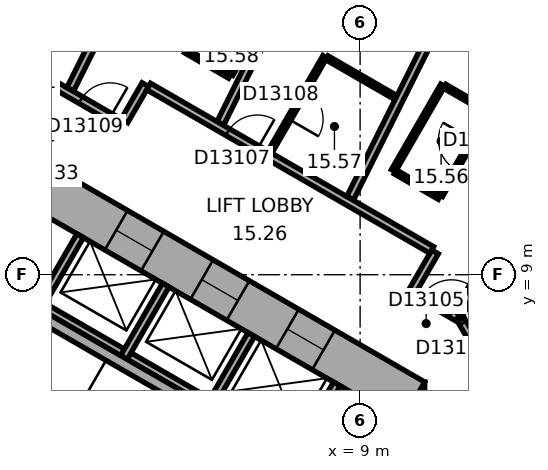
"""IFC4 building model, lengths in metres.
Left out: names, types, materials, properties, quantities, classifications, styles, units other than length and angle.
Written with IfcOpenShell. Run it as: python <this file> out.ifc"""

import sys

from ifc_helpers import new_model, si_unit, direction, frame, frame_2d, origin, place, context, subcontext, project, spatial, rectangle, extrude, element, fill, save


model = new_model("IFC4")
c1 = context("Model", 3, precision=1e-05, world=origin(), true_north=direction((0.0, 1.0)))
c2 = subcontext(c1, "Body", "Model", "MODEL_VIEW")
j1 = project(units=[si_unit("LENGTHUNIT", "METRE"), si_unit("PLANEANGLEUNIT", "RADIAN")], contexts=[c1])
p1 = place(None, origin())
s1 = spatial("IfcSite", under=j1, at=p1, CompositionType="ELEMENT")
p2 = place(p1, origin())
s2 = spatial("IfcBuilding", under=s1, at=p2, CompositionType="ELEMENT")
p3 = place(p2, frame((0.0, 0.0, 70.4)))
s3 = spatial("IfcBuildingStorey", under=s2, at=p3, CompositionType="ELEMENT", Elevation=70.4)
p4 = place(p3, frame((10.1, -6.177, 0.0), z_axis=(0.0, 0.0, 1.0), x_axis=(0.0, 1.0, 0.0)))
e1 = element("IfcWall", 1, at=p4, inside=s3, PredefinedType="SHEAR", context=c2, shape_type="SweptSolid", body=[
    extrude(rectangle(XDim=12.355, YDim=1.2, at=frame_2d((6.177, 0.0))), origin(), (0.0, 0.0, 1.0), 3.3),
])
p5 = place(p4, frame((6.378, 0.0, 0.0)))
e2 = element("IfcOpeningElement", 2, at=p5, cuts=e1, PredefinedType="OPENING", context=c2, shape_type="SweptSolid", body=[
    extrude(rectangle(XDim=1.5, YDim=2.1, at=frame_2d((0.75, 1.05))), frame((0.0, 0.61, 0.0), z_axis=(0.0, -1.0, 0.0), x_axis=(1.0, 0.0, 0.0)), (0.0, 0.0, 1.0), 1.22),
])
p6 = place(p4, frame((1.828, 0.0, 0.0)))
e3 = element("IfcOpeningElement", 3, at=p6, cuts=e1, PredefinedType="OPENING", context=c2, shape_type="SweptSolid", body=[
    extrude(rectangle(XDim=1.1, YDim=2.1, at=frame_2d((0.55, 1.05))), frame((0.0, 0.61, 0.0), z_axis=(0.0, -1.0, 0.0), x_axis=(1.0, 0.0, 0.0)), (0.0, 0.0, 1.0), 1.22),
])
p7 = place(p4, frame((4.427, 0.0, 0.0)))
e4 = element("IfcOpeningElement", 4, at=p7, cuts=e1, PredefinedType="OPENING", context=c2, shape_type="SweptSolid", body=[
    extrude(rectangle(XDim=1.1, YDim=2.1, at=frame_2d((0.55, 1.05))), frame((0.0, 0.61, 0.0), z_axis=(0.0, -1.0, 0.0), x_axis=(1.0, 0.0, 0.0)), (0.0, 0.0, 1.0), 1.22),
])
p8 = place(p3, frame((10.4, 5.658, 0.0), z_axis=(0.0, 0.0, 1.0), x_axis=(-0.866021384402, 0.500006961711, 0.0)))
e5 = element("IfcWall", 5, at=p8, inside=s3, PredefinedType="SHEAR", context=c2, shape_type="SweptSolid", body=[
    extrude(rectangle(XDim=12.355, YDim=1.2, at=frame_2d((6.178, 0.0))), origin(), (0.0, 0.0, 1.0), 3.3),
])
p9 = place(p8, frame((2.728, 0.0, 0.0)))
e6 = element("IfcOpeningElement", 6, at=p9, cuts=e5, PredefinedType="OPENING", context=c2, shape_type="SweptSolid", body=[
    extrude(rectangle(XDim=1.1, YDim=2.1, at=frame_2d((0.55, 1.05))), frame((0.0, 0.61, 0.0), z_axis=(0.0, -1.0, 0.0), x_axis=(1.0, 0.0, 0.0)), (0.0, 0.0, 1.0), 1.22),
])
p10 = place(p8, frame((5.328, 0.0, 0.0)))
e7 = element("IfcOpeningElement", 7, at=p10, cuts=e5, PredefinedType="OPENING", context=c2, shape_type="SweptSolid", body=[
    extrude(rectangle(XDim=1.1, YDim=2.1, at=frame_2d((0.55, 1.05))), frame((0.0, 0.61, 0.0), z_axis=(0.0, -1.0, 0.0), x_axis=(1.0, 0.0, 0.0)), (0.0, 0.0, 1.0), 1.22),
])
p11 = place(p8, frame((7.928, 0.0, 0.0)))
e8 = element("IfcOpeningElement", 8, at=p11, cuts=e5, PredefinedType="OPENING", context=c2, shape_type="SweptSolid", body=[
    extrude(rectangle(XDim=1.1, YDim=2.1, at=frame_2d((0.55, 1.05))), frame((0.0, 0.61, 0.0), z_axis=(0.0, -1.0, 0.0), x_axis=(1.0, 0.0, 0.0)), (0.0, 0.0, 1.0), 1.22),
])
p12 = place(p3, frame((7.424, 4.259, 0.0), z_axis=(0.0, 0.0, 1.0), x_axis=(-0.866026010844, 0.49999894854, 0.0)))
e9 = element("IfcWall", 9, at=p12, inside=s3, PredefinedType="PARTITIONING", context=c2, shape_type="SweptSolid", body=[
    extrude(rectangle(XDim=8.0, YDim=0.2, at=frame_2d((4.0, 0.0))), origin(), (0.0, 0.0, 1.0), 3.05),
])
for number, where, z_axis, x_axis in (
    (10, (7.287, 4.222, 0.0), (0.0, 0.0, 1.0), (0.5, 0.866, 0.0)),
    (11, (5.036, 5.522, 0.0), (0.0, 0.0, 1.0), (0.5, 0.866, 0.0)),
    (12, (2.784, 6.822, 0.0), (0.0, 0.0, 1.0), (0.5, 0.866, 0.0)),
    (13, (0.532, 8.122, 0.0), (0.0, 0.0, 1.0), (0.5, 0.866, 0.0)),
):
    element("IfcWall", number, at=place(p3, frame(where, z_axis=z_axis, x_axis=x_axis)), inside=s3, PredefinedType="PARTITIONING", context=c2, shape_type="SweptSolid", body=[
        extrude(rectangle(XDim=2.2, YDim=0.2, at=frame_2d((1.1, 0.0))), origin(), (0.0, 0.0, 1.0), 3.05),
    ])
p13 = place(p3, frame((6.303, 4.617, 0.0), z_axis=(0.0, 0.0, 1.0), x_axis=(-0.866027801685, 0.499995846692, 0.0)))
e14 = element("IfcWall", 14, at=p13, inside=s3, PredefinedType="SHEAR", context=c2, shape_type="SweptSolid", body=[
    extrude(rectangle(XDim=7.06, YDim=0.3, at=frame_2d((3.53, 0.0))), origin(), (0.0, 0.0, 1.0), 3.05),
])
p14 = place(p3, frame((0.95, 14.001, 0.0), z_axis=(0.0, 0.0, 1.0), x_axis=(-1.0, 0.0, 0.0)))
e15 = element("IfcWall", 15, at=p14, inside=s3, PredefinedType="PARTITIONING", context=c2, shape_type="SweptSolid", body=[
    extrude(rectangle(XDim=1.86, YDim=0.2, at=frame_2d((0.93, 0.0))), origin(), (0.0, 0.0, 1.0), 3.05),
])
p15 = place(p14, frame((0.48, 0.0, 0.0)))
e16 = element("IfcOpeningElement", 16, at=p15, cuts=e15, PredefinedType="OPENING", context=c2, shape_type="SweptSolid", body=[
    extrude(rectangle(XDim=0.9, YDim=2.1, at=frame_2d((0.45, 1.05))), frame((0.0, 0.11, 0.0), z_axis=(0.0, -1.0, 0.0), x_axis=(1.0, 0.0, 0.0)), (0.0, 0.0, 1.0), 0.22),
])
p16 = place(p3, frame((2.748, 12.962, 0.0), z_axis=(0.0, 0.0, 1.0), x_axis=(-0.866013897511, 0.50001992892, 0.0)))
e17 = element("IfcWall", 17, at=p16, inside=s3, PredefinedType="PARTITIONING", context=c2, shape_type="SweptSolid", body=[
    extrude(rectangle(XDim=2.037, YDim=0.2, at=frame_2d((1.018, 0.0))), origin(), (0.0, 0.0, 1.0), 3.05),
])
p17 = place(p16, frame((0.372, 0.0, 0.0)))
e18 = element("IfcOpeningElement", 18, at=p17, cuts=e17, PredefinedType="OPENING", context=c2, shape_type="SweptSolid", body=[
    extrude(rectangle(XDim=0.9, YDim=2.1, at=frame_2d((0.45, 1.05))), frame((0.0, 0.11, 0.0), z_axis=(0.0, -1.0, 0.0), x_axis=(1.0, 0.0, 0.0)), (0.0, 0.0, 1.0), 0.22),
])
p18 = place(p3, frame((3.349, 14.002, 0.0), z_axis=(0.0, 0.0, 1.0), x_axis=(-0.500074377092, -0.865982457891, 0.0)))
e19 = element("IfcWall", 19, at=p18, inside=s3, PredefinedType="PARTITIONING", context=c2, shape_type="SweptSolid", body=[
    extrude(rectangle(XDim=1.101, YDim=0.2, at=frame_2d((0.55, 0.0))), origin(), (0.0, 0.0, 1.0), 3.05),
])
p19 = place(p3, frame((5.351, 21.859, 0.0), z_axis=(0.0, 0.0, 1.0), x_axis=(-0.446205309328, -0.894930624086, 0.0)))
e20 = element("IfcWall", 20, at=p19, inside=s3, PredefinedType="PARTITIONING", context=c2, shape_type="SweptSolid", body=[
    extrude(rectangle(XDim=8.913, YDim=0.2, at=frame_2d((4.457, 0.0))), origin(), (0.0, 0.0, 1.0), 2.6),
])
p20 = place(p3, frame((5.569, 14.222, 0.0), z_axis=(0.0, 0.0, 1.0), x_axis=(-0.866036909293, 0.499980071345, 0.0)))
e21 = element("IfcWall", 21, at=p20, inside=s3, PredefinedType="PARTITIONING", context=c2, shape_type="SweptSolid", body=[
    extrude(rectangle(XDim=1.34, YDim=0.12, at=frame_2d((0.67, 0.0))), origin(), (0.0, 0.0, 1.0), 3.05),
])
p21 = place(p3, frame((6.625, 12.227, 0.0), z_axis=(0.0, 0.0, 1.0), x_axis=(0.500023687443, 0.866011727401, 0.0)))
e22 = element("IfcWall", 22, at=p21, inside=s3, PredefinedType="PARTITIONING", context=c2, shape_type="SweptSolid", body=[
    extrude(rectangle(XDim=2.9, YDim=0.12, at=frame_2d((1.45, 0.0))), origin(), (0.0, 0.0, 1.0), 3.05),
])
p22 = place(p21, frame((1.0, 0.0, 0.0)))
e23 = element("IfcOpeningElement", 23, at=p22, cuts=e22, PredefinedType="OPENING", context=c2, shape_type="SweptSolid", body=[
    extrude(rectangle(XDim=0.9, YDim=2.1, at=frame_2d((0.45, 1.05))), frame((0.0, 0.07, 0.0), z_axis=(0.0, -1.0, 0.0), x_axis=(1.0, 0.0, 0.0)), (0.0, 0.0, 1.0), 0.14),
])
p23 = place(p3, frame((6.839, 16.422, 0.0), z_axis=(0.0, 0.0, 1.0), x_axis=(-0.50000366821, -0.866023285932, 0.0)))
e24 = element("IfcWall", 24, at=p23, inside=s3, PredefinedType="PARTITIONING", context=c2, shape_type="SweptSolid", body=[
    extrude(rectangle(XDim=2.48, YDim=0.12, at=frame_2d((1.24, 0.0))), origin(), (0.0, 0.0, 1.0), 3.05),
])
p24 = place(p3, frame((8.127, 14.708, 0.0), z_axis=(0.0, 0.0, 1.0), x_axis=(0.866065472234, -0.499930592986, 0.0)))
e25 = element("IfcWall", 25, at=p24, inside=s3, PredefinedType="PARTITIONING", context=c2, shape_type="SweptSolid", body=[
    extrude(rectangle(XDim=2.098, YDim=0.12, at=frame_2d((1.049, 0.0))), origin(), (0.0, 0.0, 1.0), 3.05),
])
p25 = place(p3, frame((8.872, 20.104, 0.0), z_axis=(0.0, 0.0, 1.0), x_axis=(-0.446218378653, -0.894924107706, 0.0)))
e26 = element("IfcWall", 26, at=p25, inside=s3, PredefinedType="PARTITIONING", context=c2, shape_type="SweptSolid", body=[
    extrude(rectangle(XDim=7.95, YDim=0.2, at=frame_2d((3.975, 0.0))), origin(), (0.0, 0.0, 1.0), 3.05),
])
p26 = place(p3, frame((9.875, 11.736, 0.0), z_axis=(0.0, 0.0, 1.0), x_axis=(0.499936506574, 0.866062058628, 0.0)))
e27 = element("IfcWall", 27, at=p26, inside=s3, PredefinedType="PARTITIONING", context=c2, shape_type="SweptSolid", body=[
    extrude(rectangle(XDim=2.6, YDim=0.12, at=frame_2d((1.3, 0.0))), origin(), (0.0, 0.0, 1.0), 3.05),
])
p27 = place(p3, frame((10.371, 8.561, 0.0), z_axis=(0.0, 0.0, 1.0), x_axis=(0.499986357472, 0.866033280158, 0.0)))
e28 = element("IfcWall", 28, at=p27, inside=s3, PredefinedType="PARTITIONING", context=c2, shape_type="SweptSolid", body=[
    extrude(rectangle(XDim=1.201, YDim=0.2, at=frame_2d((0.601, 0.0))), origin(), (0.0, 0.0, 1.0), 3.05),
])
p28 = place(p3, frame((10.885, 9.652, 0.0), z_axis=(0.0, 0.0, 1.0), x_axis=(-0.866033868542, 0.499985338323, 0.0)))
e29 = element("IfcWall", 29, at=p28, inside=s3, PredefinedType="PARTITIONING", context=c2, shape_type="SweptSolid", body=[
    extrude(rectangle(XDim=8.602, YDim=0.2, at=frame_2d((4.301, 0.0))), origin(), (0.0, 0.0, 1.0), 3.05),
])
p29 = place(p28, frame((5.302, 0.0, 0.0)))
e30 = element("IfcOpeningElement", 30, at=p29, cuts=e29, PredefinedType="OPENING", context=c2, shape_type="SweptSolid", body=[
    extrude(rectangle(XDim=0.9, YDim=2.1, at=frame_2d((0.45, 1.05))), frame((0.0, 0.11, 0.0), z_axis=(0.0, -1.0, 0.0), x_axis=(1.0, 0.0, 0.0)), (0.0, 0.0, 1.0), 0.22),
])
for number, where, z_axis, x_axis in (
    (31, (11.087, 11.036, 0.0), (0.0, 0.0, 1.0), (-0.866, 0.5, 0.0)),
    (32, (11.226, 13.958, 0.0), (0.0, 0.0, 1.0), (0.866, -0.5, 0.0)),
):
    element("IfcWall", number, at=place(p3, frame(where, z_axis=z_axis, x_axis=x_axis)), inside=s3, PredefinedType="PARTITIONING", context=c2, shape_type="SweptSolid", body=[
        extrude(rectangle(XDim=1.34, YDim=0.12, at=frame_2d((0.67, 0.0))), origin(), (0.0, 0.0, 1.0), 3.05),
    ])
p30 = place(p3, frame((11.566, 7.871, 0.0), z_axis=(0.0, 0.0, 1.0), x_axis=(-0.866004557827, 0.500036104519, 0.0)))
e33 = element("IfcWall", 33, at=p30, inside=s3, PredefinedType="PARTITIONING", context=c2, shape_type="SweptSolid", body=[
    extrude(rectangle(XDim=1.28, YDim=0.2, at=frame_2d((0.64, 0.0))), origin(), (0.0, 0.0, 1.0), 3.05),
])
p31 = place(p30, frame((0.19, 0.0, 0.0)))
e34 = element("IfcOpeningElement", 34, at=p31, cuts=e33, PredefinedType="OPENING", context=c2, shape_type="SweptSolid", body=[
    extrude(rectangle(XDim=0.9, YDim=2.1, at=frame_2d((0.45, 1.05))), frame((0.0, 0.11, 0.0), z_axis=(0.0, -1.0, 0.0), x_axis=(1.0, 0.0, 0.0)), (0.0, 0.0, 1.0), 0.22),
])
p32 = place(p3, frame((12.357, 13.236, 0.0), z_axis=(0.0, 0.0, 1.0), x_axis=(-0.50000366821, -0.866023285932, 0.0)))
e35 = element("IfcWall", 35, at=p32, inside=s3, PredefinedType="PARTITIONING", context=c2, shape_type="SweptSolid", body=[
    extrude(rectangle(XDim=2.48, YDim=0.12, at=frame_2d((1.24, 0.0))), origin(), (0.0, 0.0, 1.0), 3.05),
])
p33 = place(p32, frame((0.79, 0.0, 0.0)))
e36 = element("IfcOpeningElement", 36, at=p33, cuts=e35, PredefinedType="OPENING", context=c2, shape_type="SweptSolid", body=[
    extrude(rectangle(XDim=0.9, YDim=2.1, at=frame_2d((0.45, 1.05))), frame((0.0, 0.07, 0.0), z_axis=(0.0, -1.0, 0.0), x_axis=(1.0, 0.0, 0.0)), (0.0, 0.0, 1.0), 0.14),
])
p34 = place(p3, frame((12.393, 18.348, 0.0), z_axis=(0.0, 0.0, 1.0), x_axis=(-0.446176022699, -0.894945225569, 0.0)))
e37 = element("IfcWall", 37, at=p34, inside=s3, PredefinedType="PARTITIONING", context=c2, shape_type="SweptSolid", body=[
    extrude(rectangle(XDim=8.191, YDim=0.2, at=frame_2d((4.095, 0.0))), origin(), (0.0, 0.0, 1.0), 2.6),
])
p35 = place(p3, frame((12.58, 6.212, 0.0), z_axis=(0.0, 0.0, 1.0), x_axis=(-0.500063286585, 0.865988862174, 0.0)))
e38 = element("IfcWall", 38, at=p35, inside=s3, PredefinedType="PARTITIONING", context=c2, shape_type="SweptSolid", body=[
    extrude(rectangle(XDim=1.86, YDim=0.2, at=frame_2d((0.93, 0.0))), origin(), (0.0, 0.0, 1.0), 3.05),
])
p36 = place(p35, frame((0.842, 0.0, 0.0)))
e39 = element("IfcOpeningElement", 39, at=p36, cuts=e38, PredefinedType="OPENING", context=c2, shape_type="SweptSolid", body=[
    extrude(rectangle(XDim=0.9, YDim=2.1, at=frame_2d((0.45, 1.05))), frame((0.0, 0.11, 0.0), z_axis=(0.0, -1.0, 0.0), x_axis=(1.0, 0.0, 0.0)), (0.0, 0.0, 1.0), 0.22),
])
p37 = place(p3, frame((15.915, 16.592, 0.0), z_axis=(0.0, 0.0, 1.0), x_axis=(-0.446199736347, -0.894933402709, 0.0)))
e40 = element("IfcWall", 40, at=p37, inside=s3, PredefinedType="PARTITIONING", context=c2, shape_type="SweptSolid", body=[
    extrude(rectangle(XDim=9.635, YDim=0.2, at=frame_2d((4.817, 0.0))), origin(), (0.0, 0.0, 1.0), 3.05),
])
p38 = place(p9, origin())
e41 = element("IfcDoor", 41, at=p38, inside=s3, OperationType="DOUBLE_DOOR_SLIDING", PredefinedType="DOOR", context=c2, shape_type="SweptSolid", body=[
    extrude(rectangle(XDim=1.1, YDim=2.1, at=frame_2d((0.55, 1.05))), frame((0.0, 0.025, 0.0), z_axis=(0.0, -1.0, 0.0), x_axis=(1.0, 0.0, 0.0)), (0.0, 0.0, 1.0), 0.05),
])
fill(e6, e41)
p39 = place(p10, origin())
e42 = element("IfcDoor", 42, at=p39, inside=s3, OperationType="DOUBLE_DOOR_SLIDING", PredefinedType="DOOR", context=c2, shape_type="SweptSolid", body=[
    extrude(rectangle(XDim=1.1, YDim=2.1, at=frame_2d((0.55, 1.05))), frame((0.0, 0.025, 0.0), z_axis=(0.0, -1.0, 0.0), x_axis=(1.0, 0.0, 0.0)), (0.0, 0.0, 1.0), 0.05),
])
fill(e7, e42)
p40 = place(p11, origin())
e43 = element("IfcDoor", 43, at=p40, inside=s3, OperationType="DOUBLE_DOOR_SLIDING", PredefinedType="DOOR", context=c2, shape_type="SweptSolid", body=[
    extrude(rectangle(XDim=1.1, YDim=2.1, at=frame_2d((0.55, 1.05))), frame((0.0, 0.025, 0.0), z_axis=(0.0, -1.0, 0.0), x_axis=(1.0, 0.0, 0.0)), (0.0, 0.0, 1.0), 0.05),
])
fill(e8, e43)
p41 = place(p36, origin())
e44 = element("IfcDoor", 44, at=p41, inside=s3, OperationType="SINGLE_SWING_LEFT", PredefinedType="DOOR", context=c2, shape_type="SweptSolid", body=[
    extrude(rectangle(XDim=0.9, YDim=2.1, at=frame_2d((0.45, 1.05))), frame((0.0, 0.025, 0.0), z_axis=(0.0, -1.0, 0.0), x_axis=(1.0, 0.0, 0.0)), (0.0, 0.0, 1.0), 0.05),
])
fill(e39, e44)
p42 = place(p31, origin())
e45 = element("IfcDoor", 45, at=p42, inside=s3, OperationType="SINGLE_SWING_LEFT", PredefinedType="DOOR", context=c2, shape_type="SweptSolid", body=[
    extrude(rectangle(XDim=0.9, YDim=2.1, at=frame_2d((0.45, 1.05))), frame((0.0, 0.025, 0.0), z_axis=(0.0, -1.0, 0.0), x_axis=(1.0, 0.0, 0.0)), (0.0, 0.0, 1.0), 0.05),
])
fill(e34, e45)
p43 = place(p33, origin())
e46 = element("IfcDoor", 46, at=p43, inside=s3, OperationType="SINGLE_SWING_LEFT", PredefinedType="DOOR", context=c2, shape_type="SweptSolid", body=[
    extrude(rectangle(XDim=0.9, YDim=2.1, at=frame_2d((0.45, 1.05))), frame((0.0, 0.025, 0.0), z_axis=(0.0, -1.0, 0.0), x_axis=(1.0, 0.0, 0.0)), (0.0, 0.0, 1.0), 0.05),
])
fill(e36, e46)
p44 = place(p29, origin())
e47 = element("IfcDoor", 47, at=p44, inside=s3, OperationType="SINGLE_SWING_LEFT", PredefinedType="DOOR", context=c2, shape_type="SweptSolid", body=[
    extrude(rectangle(XDim=0.9, YDim=2.1, at=frame_2d((0.45, 1.05))), frame((0.0, 0.025, 0.0), z_axis=(0.0, -1.0, 0.0), x_axis=(1.0, 0.0, 0.0)), (0.0, 0.0, 1.0), 0.05),
])
fill(e30, e47)
p45 = place(p22, origin())
e48 = element("IfcDoor", 48, at=p45, inside=s3, OperationType="SINGLE_SWING_LEFT", PredefinedType="DOOR", context=c2, shape_type="SweptSolid", body=[
    extrude(rectangle(XDim=0.9, YDim=2.1, at=frame_2d((0.45, 1.05))), frame((0.0, 0.025, 0.0), z_axis=(0.0, -1.0, 0.0), x_axis=(1.0, 0.0, 0.0)), (0.0, 0.0, 1.0), 0.05),
])
fill(e23, e48)
p46 = place(p17, origin())
e49 = element("IfcDoor", 49, at=p46, inside=s3, OperationType="SINGLE_SWING_LEFT", PredefinedType="DOOR", context=c2, shape_type="SweptSolid", body=[
    extrude(rectangle(XDim=0.9, YDim=2.1, at=frame_2d((0.45, 1.05))), frame((0.0, 0.025, 0.0), z_axis=(0.0, -1.0, 0.0), x_axis=(1.0, 0.0, 0.0)), (0.0, 0.0, 1.0), 0.05),
])
fill(e18, e49)
save(model, sys.argv[1])
